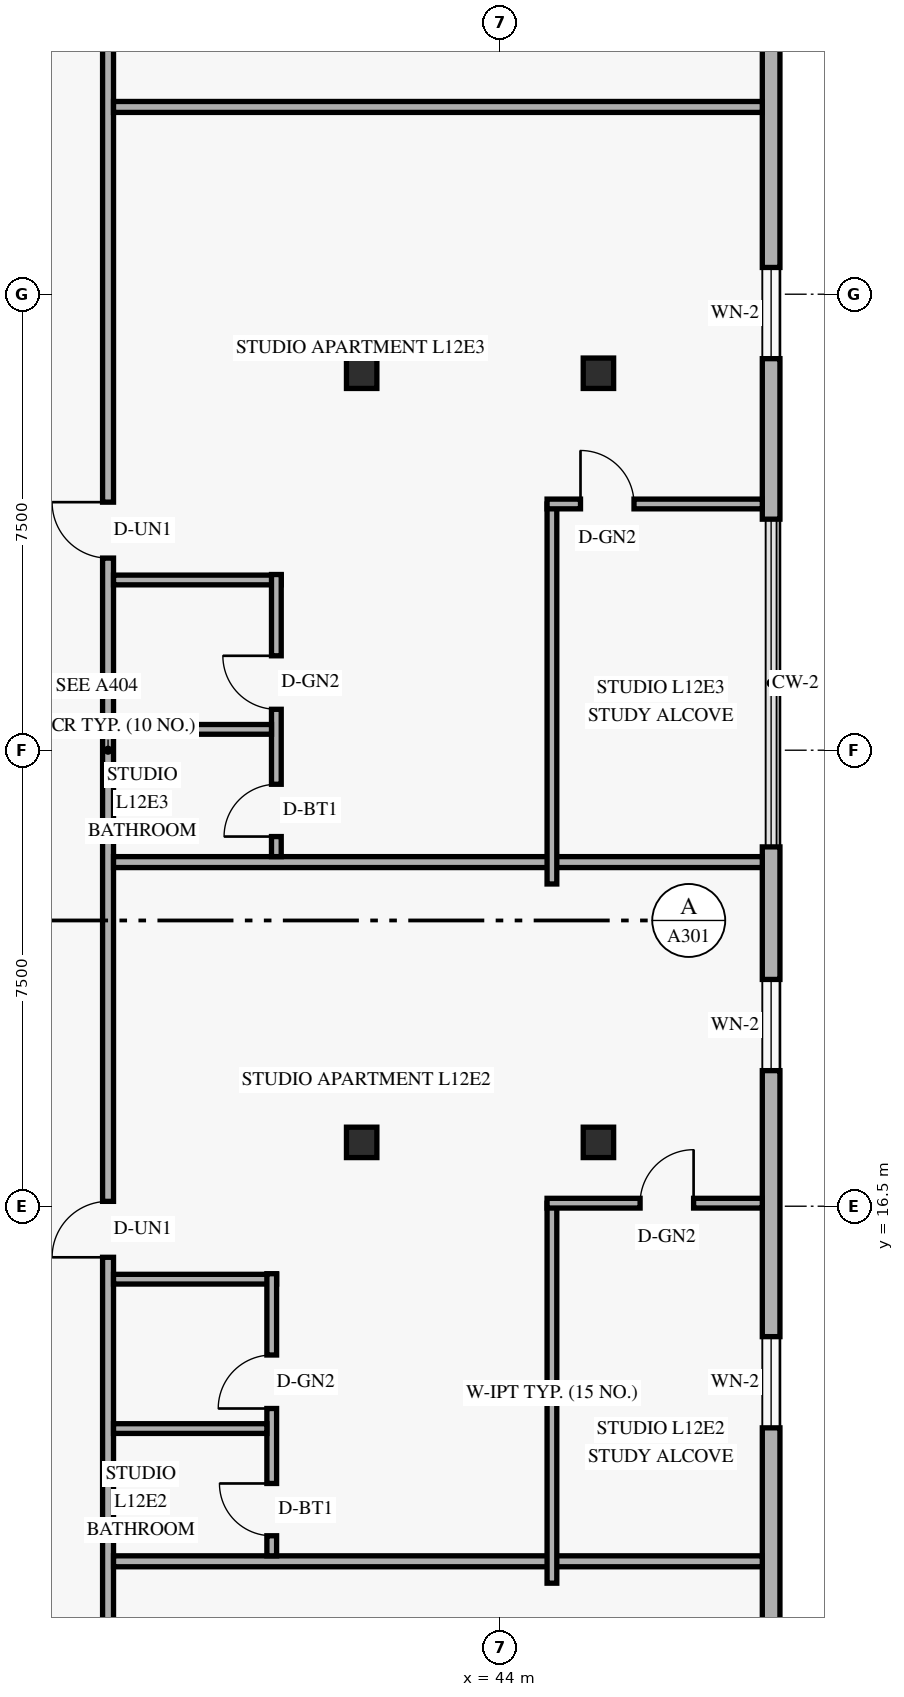
"""IFC4 building model, lengths in metres.
Left out: names, types, materials, properties, quantities, classifications, styles, units other than length and angle.
Written with IfcOpenShell. Run it as: python <this file> out.ifc"""

import sys

from ifc_helpers import new_model, si_unit, direction, frame, frame_2d, origin, origin_2d, place, context, subcontext, project, spatial, rectangle, hollow_rectangle, extrude, element, fill, save


model = new_model("IFC4")
c1 = context("Model", 3, precision=1e-05, world=origin(), true_north=direction((0.0, 1.0)))
c2 = subcontext(c1, "Body", "Model", "MODEL_VIEW")
j1 = project(units=[si_unit("LENGTHUNIT", "METRE"), si_unit("PLANEANGLEUNIT", "RADIAN")], contexts=[c1])
p1 = place(None, origin())
s1 = spatial("IfcSite", under=j1, at=p1, CompositionType="ELEMENT")
p2 = place(p1, origin())
s2 = spatial("IfcBuilding", under=s1, at=p2, CompositionType="ELEMENT")
p3 = place(p2, frame((0.0, 0.0, 49.2)))
s3 = spatial("IfcBuildingStorey", under=s2, at=p3, CompositionType="ELEMENT", Elevation=49.2)
for number, where, z_axis, x_axis in (
    (1, (41.658, 17.55, 0.0), (0.035, 0.0, 0.999), (0.0, 1.0, 0.0)),
    (2, (41.658, 30.2, 0.0), (0.035, 0.0, 0.999), (0.0, 1.0, 0.0)),
):
    element("IfcColumn", number, at=place(p3, frame(where, z_axis=z_axis, x_axis=x_axis)), inside=s3, PredefinedType="COLUMN", context=c2, shape_type="SweptSolid", body=[
        extrude(hollow_rectangle(XDim=0.5, YDim=0.5, WallThickness=0.022, at=origin_2d()), origin(), (0.0, 0.0, 1.0), 3.602),
    ])
for number, where, z_axis, x_axis in (
    (3, (45.51, 17.55, 0.0), (0.058, 0.0, 0.998), (0.0, 1.0, 0.0)),
    (4, (45.51, 30.2, 0.0), (0.058, 0.0, 0.998), (0.0, 1.0, 0.0)),
):
    element("IfcColumn", number, at=place(p3, frame(where, z_axis=z_axis, x_axis=x_axis)), inside=s3, PredefinedType="COLUMN", context=c2, shape_type="SweptSolid", body=[
        extrude(hollow_rectangle(XDim=0.5, YDim=0.5, WallThickness=0.022, at=origin_2d()), origin(), (0.0, 0.0, 1.0), 3.606),
    ])
p4 = place(p3, frame((48.455, 4.62, 0.0), z_axis=(0.0, 0.0, 1.0), x_axis=(0.0, 1.0, 0.0)))
e5 = element("IfcWall", 5, at=p4, inside=s3, PredefinedType="SOLIDWALL", context=c2, shape_type="SweptSolid", body=[
    extrude(rectangle(XDim=17.79, YDim=0.29, at=frame_2d((8.895, 0.0))), origin(), (0.0, 0.0, 1.0), 3.36),
])
p5 = place(p4, frame((2.27, 0.0, 0.85)))
e6 = element("IfcOpeningElement", 6, at=p5, cuts=e5, PredefinedType="OPENING", context=c2, shape_type="SweptSolid", body=[
    extrude(rectangle(XDim=1.5, YDim=1.55, at=frame_2d((0.75, 0.775))), frame((0.0, 0.155, 0.0), z_axis=(0.0, -1.0, 0.0), x_axis=(1.0, 0.0, 0.0)), (0.0, 0.0, 1.0), 0.31),
])
p6 = place(p4, frame((8.235, 0.0, 0.85)))
e7 = element("IfcOpeningElement", 7, at=p6, cuts=e5, PredefinedType="OPENING", context=c2, shape_type="SweptSolid", body=[
    extrude(rectangle(XDim=1.5, YDim=1.55, at=frame_2d((0.75, 0.775))), frame((0.0, 0.155, 0.0), z_axis=(0.0, -1.0, 0.0), x_axis=(1.0, 0.0, 0.0)), (0.0, 0.0, 1.0), 0.31),
])
p7 = place(p4, frame((14.11, 0.0, 0.85)))
e8 = element("IfcOpeningElement", 8, at=p7, cuts=e5, PredefinedType="OPENING", context=c2, shape_type="SweptSolid", body=[
    extrude(rectangle(XDim=1.5, YDim=1.55, at=frame_2d((0.75, 0.775))), frame((0.0, 0.155, 0.0), z_axis=(0.0, -1.0, 0.0), x_axis=(1.0, 0.0, 0.0)), (0.0, 0.0, 1.0), 0.31),
])
p8 = place(p3, frame((48.455, 27.8, 0.0), z_axis=(0.0, 0.0, 1.0), x_axis=(0.0, 1.0, 0.0)))
e9 = element("IfcWall", 9, at=p8, inside=s3, PredefinedType="SOLIDWALL", context=c2, shape_type="SweptSolid", body=[
    extrude(rectangle(XDim=15.58, YDim=0.29, at=frame_2d((7.79, 0.0))), origin(), (0.0, 0.0, 1.0), 3.36),
])
p9 = place(p8, frame((2.64, 0.0, 0.85)))
e10 = element("IfcOpeningElement", 10, at=p9, cuts=e9, PredefinedType="OPENING", context=c2, shape_type="SweptSolid", body=[
    extrude(rectangle(XDim=1.5, YDim=1.55, at=frame_2d((0.75, 0.775))), frame((0.0, 0.155, 0.0), z_axis=(0.0, -1.0, 0.0), x_axis=(1.0, 0.0, 0.0)), (0.0, 0.0, 1.0), 0.31),
])
p10 = place(p8, frame((10.43, 0.0, 0.85)))
e11 = element("IfcOpeningElement", 11, at=p10, cuts=e9, PredefinedType="OPENING", context=c2, shape_type="SweptSolid", body=[
    extrude(rectangle(XDim=1.5, YDim=1.55, at=frame_2d((0.75, 0.775))), frame((0.0, 0.155, 0.0), z_axis=(0.0, -1.0, 0.0), x_axis=(1.0, 0.0, 0.0)), (0.0, 0.0, 1.0), 0.31),
])
p11 = place(p3, frame((37.55, 1.29, 0.0), z_axis=(0.0, 0.0, 1.0), x_axis=(0.0, 1.0, 0.0)))
e12 = element("IfcWall", 12, at=p11, inside=s3, PredefinedType="STANDARD", context=c2, shape_type="SweptSolid", body=[
    extrude(rectangle(XDim=45.42, YDim=0.18, at=frame_2d((22.71, 0.0))), origin(), (0.0, 0.0, 1.0), 2.649),
])
p12 = place(p11, frame((4.46, 0.0, 0.0)))
e13 = element("IfcOpeningElement", 13, at=p12, cuts=e12, PredefinedType="OPENING", context=c2, shape_type="SweptSolid", body=[
    extrude(rectangle(XDim=0.92, YDim=2.15, at=frame_2d((0.46, 1.075))), frame((0.0, 0.1, 0.0), z_axis=(0.0, -1.0, 0.0), x_axis=(1.0, 0.0, 0.0)), (0.0, 0.0, 1.0), 0.2),
])
p13 = place(p11, frame((14.37, 0.0, 0.0)))
e14 = element("IfcOpeningElement", 14, at=p13, cuts=e12, PredefinedType="OPENING", context=c2, shape_type="SweptSolid", body=[
    extrude(rectangle(XDim=0.92, YDim=2.15, at=frame_2d((0.46, 1.075))), frame((0.0, 0.1, 0.0), z_axis=(0.0, -1.0, 0.0), x_axis=(1.0, 0.0, 0.0)), (0.0, 0.0, 1.0), 0.2),
])
p14 = place(p11, frame((25.87, 0.0, 0.0)))
e15 = element("IfcOpeningElement", 15, at=p14, cuts=e12, PredefinedType="OPENING", context=c2, shape_type="SweptSolid", body=[
    extrude(rectangle(XDim=0.92, YDim=2.15, at=frame_2d((0.46, 1.075))), frame((0.0, 0.1, 0.0), z_axis=(0.0, -1.0, 0.0), x_axis=(1.0, 0.0, 0.0)), (0.0, 0.0, 1.0), 0.2),
])
p15 = place(p11, frame((40.02, 0.0, 0.0)))
e16 = element("IfcOpeningElement", 16, at=p15, cuts=e12, PredefinedType="OPENING", context=c2, shape_type="SweptSolid", body=[
    extrude(rectangle(XDim=0.92, YDim=2.15, at=frame_2d((0.46, 1.075))), frame((0.0, 0.1, 0.0), z_axis=(0.0, -1.0, 0.0), x_axis=(1.0, 0.0, 0.0)), (0.0, 0.0, 1.0), 0.2),
])
p16 = place(p3, frame((37.64, 10.66, 0.0), z_axis=(0.0, 0.0, 1.0), x_axis=(1.0, 0.0, 0.0)))
e17 = element("IfcWall", 17, at=p16, inside=s3, PredefinedType="PARTITIONING", context=c2, shape_type="SweptSolid", body=[
    extrude(rectangle(XDim=10.67, YDim=0.18, at=frame_2d((5.335, 0.0))), origin(), (0.0, 0.0, 1.0), 2.649),
])
p17 = place(p3, frame((37.64, 15.3, 0.0), z_axis=(0.0, 0.0, 1.0), x_axis=(1.0, 0.0, 0.0)))
e18 = element("IfcWall", 18, at=p17, inside=s3, PredefinedType="PLUMBINGWALL", context=c2, shape_type="SweptSolid", body=[
    extrude(rectangle(XDim=2.682, YDim=0.16, at=frame_2d((1.341, 0.0))), origin(), (0.0, 0.0, 1.0), 3.36),
])
p18 = place(p3, frame((40.242, 10.75, 0.0), z_axis=(0.0, 0.0, 1.0), x_axis=(0.0, 1.0, 0.0)))
e19 = element("IfcWall", 19, at=p18, inside=s3, PredefinedType="PLUMBINGWALL", context=c2, shape_type="SweptSolid", body=[
    extrude(rectangle(XDim=4.64, YDim=0.16, at=frame_2d((2.32, 0.0))), origin(), (0.0, 0.0, 1.0), 2.932),
])
p19 = place(p18, frame((0.33, 0.0, 0.0)))
e20 = element("IfcOpeningElement", 20, at=p19, cuts=e19, PredefinedType="OPENING", context=c2, shape_type="SweptSolid", body=[
    extrude(rectangle(XDim=0.86, YDim=2.12, at=frame_2d((0.43, 1.06))), frame((0.0, 0.09, 0.0), z_axis=(0.0, -1.0, 0.0), x_axis=(1.0, 0.0, 0.0)), (0.0, 0.0, 1.0), 0.18),
])
p20 = place(p18, frame((2.423, 0.0, 0.0)))
e21 = element("IfcOpeningElement", 21, at=p20, cuts=e19, PredefinedType="OPENING", context=c2, shape_type="SweptSolid", body=[
    extrude(rectangle(XDim=0.88, YDim=2.12, at=frame_2d((0.44, 1.06))), frame((0.0, 0.09, 0.0), z_axis=(0.0, -1.0, 0.0), x_axis=(1.0, 0.0, 0.0)), (0.0, 0.0, 1.0), 0.18),
])
p21 = place(p3, frame((37.64, 12.843, 0.0), z_axis=(0.0, 0.0, 1.0), x_axis=(1.0, 0.0, 0.0)))
e22 = element("IfcWall", 22, at=p21, inside=s3, PredefinedType="PLUMBINGWALL", context=c2, shape_type="SweptSolid", body=[
    extrude(rectangle(XDim=2.522, YDim=0.16, at=frame_2d((1.261, 0.0))), origin(), (0.0, 0.0, 1.0), 3.36),
])
p22 = place(p3, frame((44.85, 10.3, 0.0), z_axis=(0.0, 0.0, 1.0), x_axis=(0.0, 1.0, 0.0)))
e23 = element("IfcWall", 23, at=p22, inside=s3, PredefinedType="PARTITIONING", context=c2, shape_type="SweptSolid", body=[
    extrude(rectangle(XDim=6.25, YDim=0.16, at=frame_2d((3.125, 0.0))), origin(), (0.0, 0.0, 1.0), 2.932),
])
p23 = place(p3, frame((44.77, 16.55, 0.0), z_axis=(0.0, 0.0, 1.0), x_axis=(1.0, 0.0, 0.0)))
e24 = element("IfcWall", 24, at=p23, inside=s3, PredefinedType="PARTITIONING", context=c2, shape_type="SweptSolid", body=[
    extrude(rectangle(XDim=3.54, YDim=0.16, at=frame_2d((1.77, 0.0))), origin(), (0.0, 0.0, 1.0), 2.809),
])
p24 = place(p23, frame((1.53, 0.0, 0.0)))
e25 = element("IfcOpeningElement", 25, at=p24, cuts=e24, PredefinedType="OPENING", context=c2, shape_type="SweptSolid", body=[
    extrude(rectangle(XDim=0.88, YDim=2.12, at=frame_2d((0.44, 1.06))), frame((0.0, 0.09, 0.0), z_axis=(0.0, -1.0, 0.0), x_axis=(1.0, 0.0, 0.0)), (0.0, 0.0, 1.0), 0.18),
])
p25 = place(p3, frame((37.64, 22.16, 0.0), z_axis=(0.0, 0.0, 1.0), x_axis=(1.0, 0.0, 0.0)))
e26 = element("IfcWall", 26, at=p25, inside=s3, PredefinedType="PARTITIONING", context=c2, shape_type="SweptSolid", body=[
    extrude(rectangle(XDim=10.67, YDim=0.18, at=frame_2d((5.335, 0.0))), origin(), (0.0, 0.0, 1.0), 2.649),
])
p26 = place(p3, frame((37.64, 26.8, 0.0), z_axis=(0.0, 0.0, 1.0), x_axis=(1.0, 0.0, 0.0)))
e27 = element("IfcWall", 27, at=p26, inside=s3, PredefinedType="PLUMBINGWALL", context=c2, shape_type="SweptSolid", body=[
    extrude(rectangle(XDim=2.758, YDim=0.16, at=frame_2d((1.379, 0.0))), origin(), (0.0, 0.0, 1.0), 3.36),
])
p27 = place(p3, frame((40.318, 22.25, 0.0), z_axis=(0.0, 0.0, 1.0), x_axis=(0.0, 1.0, 0.0)))
e28 = element("IfcWall", 28, at=p27, inside=s3, PredefinedType="PLUMBINGWALL", context=c2, shape_type="SweptSolid", body=[
    extrude(rectangle(XDim=4.64, YDim=0.16, at=frame_2d((2.32, 0.0))), origin(), (0.0, 0.0, 1.0), 2.932),
])
p28 = place(p27, frame((0.33, 0.0, 0.0)))
e29 = element("IfcOpeningElement", 29, at=p28, cuts=e28, PredefinedType="OPENING", context=c2, shape_type="SweptSolid", body=[
    extrude(rectangle(XDim=0.86, YDim=2.12, at=frame_2d((0.43, 1.06))), frame((0.0, 0.09, 0.0), z_axis=(0.0, -1.0, 0.0), x_axis=(1.0, 0.0, 0.0)), (0.0, 0.0, 1.0), 0.18),
])
p29 = place(p27, frame((2.423, 0.0, 0.0)))
e30 = element("IfcOpeningElement", 30, at=p29, cuts=e28, PredefinedType="OPENING", context=c2, shape_type="SweptSolid", body=[
    extrude(rectangle(XDim=0.88, YDim=2.12, at=frame_2d((0.44, 1.06))), frame((0.0, 0.09, 0.0), z_axis=(0.0, -1.0, 0.0), x_axis=(1.0, 0.0, 0.0)), (0.0, 0.0, 1.0), 0.18),
])
p30 = place(p3, frame((37.64, 24.343, 0.0), z_axis=(0.0, 0.0, 1.0), x_axis=(1.0, 0.0, 0.0)))
e31 = element("IfcWall", 31, at=p30, inside=s3, PredefinedType="PLUMBINGWALL", context=c2, shape_type="SweptSolid", body=[
    extrude(rectangle(XDim=2.598, YDim=0.16, at=frame_2d((1.299, 0.0))), origin(), (0.0, 0.0, 1.0), 3.36),
])
p31 = place(p3, frame((44.85, 21.8, 0.0), z_axis=(0.0, 0.0, 1.0), x_axis=(0.0, 1.0, 0.0)))
e32 = element("IfcWall", 32, at=p31, inside=s3, PredefinedType="PARTITIONING", context=c2, shape_type="SweptSolid", body=[
    extrude(rectangle(XDim=6.25, YDim=0.16, at=frame_2d((3.125, 0.0))), origin(), (0.0, 0.0, 1.0), 2.932),
])
p32 = place(p3, frame((44.77, 28.05, 0.0), z_axis=(0.0, 0.0, 1.0), x_axis=(1.0, 0.0, 0.0)))
e33 = element("IfcWall", 33, at=p32, inside=s3, PredefinedType="PARTITIONING", context=c2, shape_type="SweptSolid", body=[
    extrude(rectangle(XDim=3.54, YDim=0.16, at=frame_2d((1.77, 0.0))), origin(), (0.0, 0.0, 1.0), 2.809),
])
p33 = place(p32, frame((0.55, 0.0, 0.0)))
e34 = element("IfcOpeningElement", 34, at=p33, cuts=e33, PredefinedType="OPENING", context=c2, shape_type="SweptSolid", body=[
    extrude(rectangle(XDim=0.88, YDim=2.12, at=frame_2d((0.44, 1.06))), frame((0.0, 0.09, 0.0), z_axis=(0.0, -1.0, 0.0), x_axis=(1.0, 0.0, 0.0)), (0.0, 0.0, 1.0), 0.18),
])
p34 = place(p3, frame((37.64, 34.58, 0.0), z_axis=(0.0, 0.0, 1.0), x_axis=(1.0, 0.0, 0.0)))
e35 = element("IfcWall", 35, at=p34, inside=s3, PredefinedType="PARTITIONING", context=c2, shape_type="SweptSolid", body=[
    extrude(rectangle(XDim=10.67, YDim=0.18, at=frame_2d((5.335, 0.0))), origin(), (0.0, 0.0, 1.0), 2.649),
])
p35 = place(p6, origin())
e36 = element("IfcWindow", 36, at=p35, inside=s3, PartitioningType="SINGLE_PANEL", PredefinedType="WINDOW", context=c2, shape_type="SweptSolid", body=[
    extrude(rectangle(XDim=1.5, YDim=1.55, at=frame_2d((0.75, 0.775))), frame((0.0, 0.03, 0.0), z_axis=(0.0, -1.0, 0.0), x_axis=(1.0, 0.0, 0.0)), (0.0, 0.0, 1.0), 0.06),
])
fill(e7, e36)
p36 = place(p7, origin())
e37 = element("IfcWindow", 37, at=p36, inside=s3, PartitioningType="SINGLE_PANEL", PredefinedType="WINDOW", context=c2, shape_type="SweptSolid", body=[
    extrude(rectangle(XDim=1.5, YDim=1.55, at=frame_2d((0.75, 0.775))), frame((0.0, 0.03, 0.0), z_axis=(0.0, -1.0, 0.0), x_axis=(1.0, 0.0, 0.0)), (0.0, 0.0, 1.0), 0.06),
])
fill(e8, e37)
p37 = place(p9, origin())
e38 = element("IfcWindow", 38, at=p37, inside=s3, PartitioningType="SINGLE_PANEL", PredefinedType="WINDOW", context=c2, shape_type="SweptSolid", body=[
    extrude(rectangle(XDim=1.5, YDim=1.55, at=frame_2d((0.75, 0.775))), frame((0.0, 0.03, 0.0), z_axis=(0.0, -1.0, 0.0), x_axis=(1.0, 0.0, 0.0)), (0.0, 0.0, 1.0), 0.06),
])
fill(e10, e38)
p38 = place(p24, origin())
e39 = element("IfcDoor", 39, at=p38, inside=s3, OperationType="SINGLE_SWING_RIGHT", PredefinedType="DOOR", context=c2, shape_type="SweptSolid", body=[
    extrude(rectangle(XDim=0.88, YDim=2.12, at=frame_2d((0.44, 1.06))), frame((0.0, 0.025, 0.0), z_axis=(0.0, -1.0, 0.0), x_axis=(1.0, 0.0, 0.0)), (0.0, 0.0, 1.0), 0.05),
])
fill(e25, e39)
p39 = place(p13, origin())
e40 = element("IfcDoor", 40, at=p39, inside=s3, OperationType="SINGLE_SWING_LEFT", PredefinedType="DOOR", context=c2, shape_type="SweptSolid", body=[
    extrude(rectangle(XDim=0.92, YDim=2.15, at=frame_2d((0.46, 1.075))), frame((0.0, 0.025, 0.0), z_axis=(0.0, -1.0, 0.0), x_axis=(1.0, 0.0, 0.0)), (0.0, 0.0, 1.0), 0.05),
])
fill(e14, e40)
p40 = place(p19, origin())
e41 = element("IfcDoor", 41, at=p40, inside=s3, OperationType="SINGLE_SWING_RIGHT", PredefinedType="DOOR", context=c2, shape_type="SweptSolid", body=[
    extrude(rectangle(XDim=0.86, YDim=2.12, at=frame_2d((0.43, 1.06))), frame((0.0, 0.025, 0.0), z_axis=(0.0, -1.0, 0.0), x_axis=(1.0, 0.0, 0.0)), (0.0, 0.0, 1.0), 0.05),
])
fill(e20, e41)
p41 = place(p20, origin())
e42 = element("IfcDoor", 42, at=p41, inside=s3, OperationType="SINGLE_SWING_LEFT", PredefinedType="DOOR", context=c2, shape_type="SweptSolid", body=[
    extrude(rectangle(XDim=0.88, YDim=2.12, at=frame_2d((0.44, 1.06))), frame((0.0, 0.025, 0.0), z_axis=(0.0, -1.0, 0.0), x_axis=(1.0, 0.0, 0.0)), (0.0, 0.0, 1.0), 0.05),
])
fill(e21, e42)
p42 = place(p33, origin())
e43 = element("IfcDoor", 43, at=p42, inside=s3, OperationType="SINGLE_SWING_LEFT", PredefinedType="DOOR", context=c2, shape_type="SweptSolid", body=[
    extrude(rectangle(XDim=0.88, YDim=2.12, at=frame_2d((0.44, 1.06))), frame((0.0, 0.025, 0.0), z_axis=(0.0, -1.0, 0.0), x_axis=(1.0, 0.0, 0.0)), (0.0, 0.0, 1.0), 0.05),
])
fill(e34, e43)
p43 = place(p14, origin())
e44 = element("IfcDoor", 44, at=p43, inside=s3, OperationType="SINGLE_SWING_RIGHT", PredefinedType="DOOR", context=c2, shape_type="SweptSolid", body=[
    extrude(rectangle(XDim=0.92, YDim=2.15, at=frame_2d((0.46, 1.075))), frame((0.0, 0.025, 0.0), z_axis=(0.0, -1.0, 0.0), x_axis=(1.0, 0.0, 0.0)), (0.0, 0.0, 1.0), 0.05),
])
fill(e15, e44)
p44 = place(p28, origin())
e45 = element("IfcDoor", 45, at=p44, inside=s3, OperationType="SINGLE_SWING_LEFT", PredefinedType="DOOR", context=c2, shape_type="SweptSolid", body=[
    extrude(rectangle(XDim=0.86, YDim=2.12, at=frame_2d((0.43, 1.06))), frame((0.0, 0.025, 0.0), z_axis=(0.0, -1.0, 0.0), x_axis=(1.0, 0.0, 0.0)), (0.0, 0.0, 1.0), 0.05),
])
fill(e29, e45)
p45 = place(p29, origin())
e46 = element("IfcDoor", 46, at=p45, inside=s3, OperationType="SINGLE_SWING_RIGHT", PredefinedType="DOOR", context=c2, shape_type="SweptSolid", body=[
    extrude(rectangle(XDim=0.88, YDim=2.12, at=frame_2d((0.44, 1.06))), frame((0.0, 0.025, 0.0), z_axis=(0.0, -1.0, 0.0), x_axis=(1.0, 0.0, 0.0)), (0.0, 0.0, 1.0), 0.05),
])
fill(e30, e46)
save(model, sys.argv[1])
